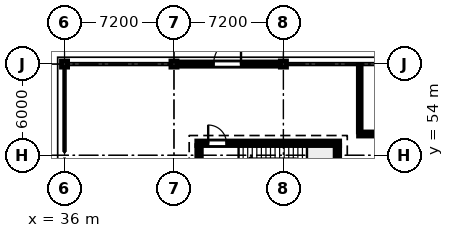
"""IFC4 building model, lengths in metres.
Left out: names, types, materials, properties, quantities, classifications, styles, units other than length and angle.
Written with IfcOpenShell. Run it as: python <this file> out.ifc"""

import sys

from ifc_helpers import new_model, si_unit, direction, frame, frame_2d, origin, origin_2d, place, context, subcontext, project, spatial, rectangle, i_section, extrude, element, fill, save


model = new_model("IFC4")
c1 = context("Model", 3, precision=1e-05, world=origin(), true_north=direction((0.0, 1.0)))
c2 = subcontext(c1, "Body", "Model", "MODEL_VIEW")
j1 = project(units=[si_unit("LENGTHUNIT", "METRE"), si_unit("PLANEANGLEUNIT", "RADIAN")], contexts=[c1])
p1 = place(None, origin())
s1 = spatial("IfcSite", under=j1, at=p1, CompositionType="ELEMENT")
p2 = place(p1, origin())
s2 = spatial("IfcBuilding", under=s1, at=p2, CompositionType="ELEMENT")
p3 = place(p2, origin())
s3 = spatial("IfcBuildingStorey", under=s2, at=p3, CompositionType="ELEMENT", Elevation=0.0)
for number, where, z_axis, x_axis in (
    (1, (36.0, 60.0, 0.0), (0.0, 0.0, 1.0), (1.0, 0.0, 0.0)),
    (2, (43.2, 60.0, 0.0), (0.0, 0.0, 1.0), (1.0, 0.0, 0.0)),
    (3, (50.4, 60.0, 0.0), (0.0, 0.0, 1.0), (1.0, 0.0, 0.0)),
):
    element("IfcColumn", number, at=place(p3, frame(where, z_axis=z_axis, x_axis=x_axis)), inside=s3, PredefinedType="COLUMN", context=c2, shape_type="SweptSolid", body=[
        extrude(i_section(OverallWidth=0.404, OverallDepth=0.406, WebThickness=0.027, FlangeThickness=0.044, FilletRadius=0.015, at=origin_2d()), origin(), (0.0, 0.0, 1.0), 6.0),
    ])
p4 = place(p3, frame((43.409, 60.0, 0.0), z_axis=(0.0, 0.0, 1.0), x_axis=(1.0, 0.0, 0.0)))
e4 = element("IfcWall", 4, at=p4, inside=s3, PredefinedType="STANDARD", context=c2, shape_type="SweptSolid", body=[
    extrude(rectangle(XDim=6.782, YDim=0.28, at=frame_2d((3.391, 0.0))), origin(), (0.0, 0.0, 1.0), 4.482),
])
p5 = place(p4, frame((2.401, 0.0, 0.0)))
e5 = element("IfcOpeningElement", 5, at=p5, cuts=e4, PredefinedType="OPENING", context=c2, shape_type="SweptSolid", body=[
    extrude(rectangle(XDim=1.8, YDim=2.2, at=frame_2d((0.9, 1.1))), frame((0.0, 0.15, 0.0), z_axis=(0.0, -1.0, 0.0), x_axis=(1.0, 0.0, 0.0)), (0.0, 0.0, 1.0), 0.3),
])
p6 = place(p3, frame((44.7, 54.79, 0.0), z_axis=(0.0, 0.0, 1.0), x_axis=(1.0, 0.0, 0.0)))
e6 = element("IfcWall", 6, at=p6, inside=s3, PredefinedType="SOLIDWALL", context=c2, shape_type="SweptSolid", body=[
    extrude(rectangle(XDim=9.4, YDim=0.3, at=frame_2d((4.7, 0.0))), origin(), (0.0, 0.0, 1.0), 5.18),
])
p7 = place(p6, frame((0.75, 0.0, 0.0)))
e7 = element("IfcOpeningElement", 7, at=p7, cuts=e6, PredefinedType="OPENING", context=c2, shape_type="SweptSolid", body=[
    extrude(rectangle(XDim=1.2, YDim=2.2, at=frame_2d((0.6, 1.1))), frame((0.0, 0.16, 0.0), z_axis=(0.0, -1.0, 0.0), x_axis=(1.0, 0.0, 0.0)), (0.0, 0.0, 1.0), 0.32),
])
p8 = place(p3, frame((44.85, 51.0, 0.0), z_axis=(0.0, 0.0, 1.0), x_axis=(0.0, 1.0, 0.0)))
e8 = element("IfcWall", 8, at=p8, inside=s3, PredefinedType="SOLIDWALL", context=c2, shape_type="SweptSolid", body=[
    extrude(rectangle(XDim=3.64, YDim=0.3, at=frame_2d((1.82, 0.0))), origin(), (0.0, 0.0, 1.0), 5.18),
])
p9 = place(p8, frame((1.22, 0.0, 0.0)))
e9 = element("IfcOpeningElement", 9, at=p9, cuts=e8, PredefinedType="OPENING", context=c2, shape_type="SweptSolid", body=[
    extrude(rectangle(XDim=1.2, YDim=2.2, at=frame_2d((0.6, 1.1))), frame((0.0, 0.16, 0.0), z_axis=(0.0, -1.0, 0.0), x_axis=(1.0, 0.0, 0.0)), (0.0, 0.0, 1.0), 0.32),
])
p10 = place(p3, frame((53.95, 54.64, 0.0), z_axis=(0.0, 0.0, 1.0), x_axis=(0.0, -1.0, 0.0)))
e10 = element("IfcWall", 10, at=p10, inside=s3, PredefinedType="SOLIDWALL", context=c2, shape_type="SweptSolid", body=[
    extrude(rectangle(XDim=3.64, YDim=0.3, at=frame_2d((1.82, 0.0))), origin(), (0.0, 0.0, 1.0), 5.18),
])
p11 = place(p3, frame((72.08, 55.4, 0.0), z_axis=(0.0, 0.0, 1.0), x_axis=(-1.0, 0.0, 0.0)))
e11 = element("IfcWall", 11, at=p11, inside=s3, PredefinedType="PARTITIONING", context=c2, shape_type="SweptSolid", body=[
    extrude(rectangle(XDim=16.74, YDim=0.27, at=frame_2d((8.37, 0.0))), origin(), (0.0, 0.0, 1.0), 4.477),
])
p12 = place(p11, frame((7.6, 0.0, 0.0)))
e12 = element("IfcOpeningElement", 12, at=p12, cuts=e11, PredefinedType="OPENING", context=c2, shape_type="SweptSolid", body=[
    extrude(rectangle(XDim=1.54, YDim=2.1, at=frame_2d((0.77, 1.05))), frame((0.0, 0.145, 0.0), z_axis=(0.0, -1.0, 0.0), x_axis=(1.0, 0.0, 0.0)), (0.0, 0.0, 1.0), 0.29),
])
p13 = place(p11, frame((10.39, 0.0, 0.95)))
e13 = element("IfcOpeningElement", 13, at=p13, cuts=e11, PredefinedType="OPENING", context=c2, shape_type="SweptSolid", body=[
    extrude(rectangle(XDim=1.2, YDim=1.0, at=frame_2d((0.6, 0.5))), frame((0.0, 0.145, 0.0), z_axis=(0.0, -1.0, 0.0), x_axis=(1.0, 0.0, 0.0)), (0.0, 0.0, 1.0), 0.29),
])
p14 = place(p3, frame((55.42, 55.537, 0.0), z_axis=(0.0, 0.0, 1.0), x_axis=(0.0, 1.0, 0.0)))
e14 = element("IfcWall", 14, at=p14, inside=s3, PredefinedType="PARTITIONING", context=c2, shape_type="SweptSolid", body=[
    extrude(rectangle(XDim=4.381, YDim=0.185, at=frame_2d((2.19, 0.0))), origin(), (0.0, 0.0, 1.0), 4.477),
])
p15 = place(p5, origin())
e15 = element("IfcDoor", 15, at=p15, inside=s3, OperationType="SINGLE_SWING_RIGHT", PredefinedType="DOOR", context=c2, shape_type="SweptSolid", body=[
    extrude(rectangle(XDim=1.8, YDim=2.2, at=frame_2d((0.9, 1.1))), frame((0.0, 0.025, 0.0), z_axis=(0.0, -1.0, 0.0), x_axis=(1.0, 0.0, 0.0)), (0.0, 0.0, 1.0), 0.05),
])
fill(e5, e15)
p16 = place(p7, origin())
e16 = element("IfcDoor", 16, at=p16, inside=s3, OperationType="SINGLE_SWING_LEFT", PredefinedType="DOOR", context=c2, shape_type="SweptSolid", body=[
    extrude(rectangle(XDim=1.2, YDim=2.2, at=frame_2d((0.6, 1.1))), frame((0.0, 0.025, 0.0), z_axis=(0.0, -1.0, 0.0), x_axis=(1.0, 0.0, 0.0)), (0.0, 0.0, 1.0), 0.05),
])
fill(e7, e16)
save(model, sys.argv[1])
